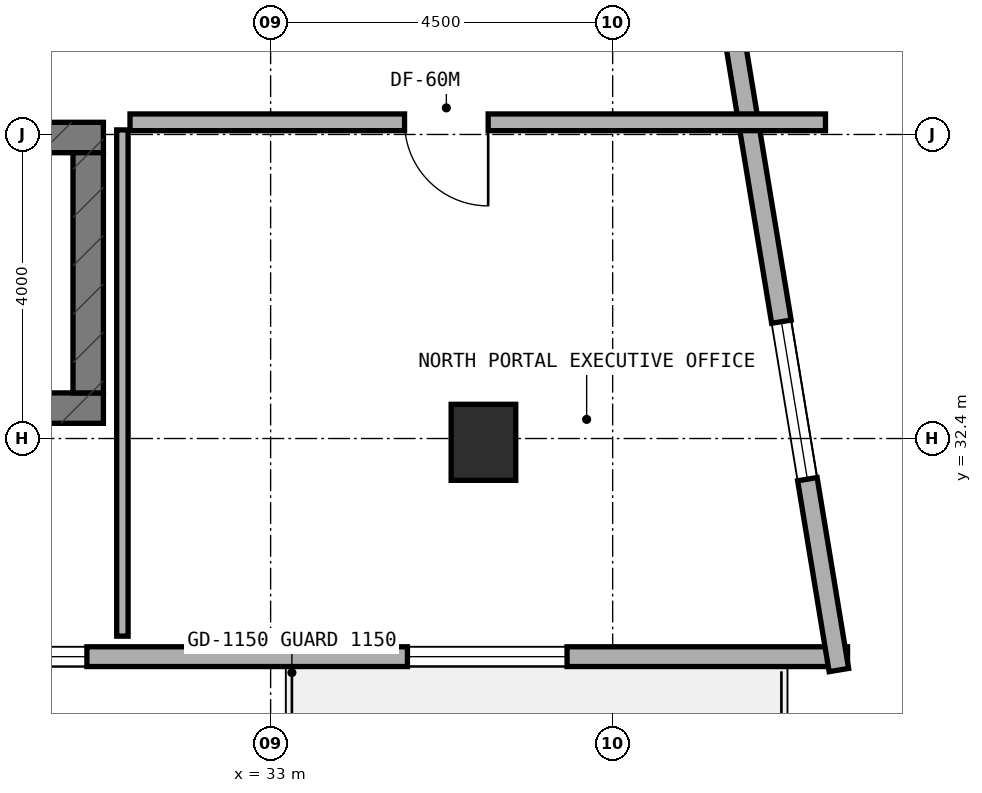
"""IFC4 building model, lengths in metres.
Left out: names, types, materials, properties, quantities, classifications, styles, units other than length and angle.
Written with IfcOpenShell. Run it as: python <this file> out.ifc"""

import sys

from ifc_helpers import new_model, si_unit, direction, frame, frame_2d, origin, origin_2d, place, context, subcontext, project, spatial, rectangle, extrude, element, fill, save


model = new_model("IFC4")
c1 = context("Model", 3, precision=1e-05, world=origin(), true_north=direction((0.0, 1.0)))
c2 = subcontext(c1, "Body", "Model", "MODEL_VIEW")
j1 = project(units=[si_unit("LENGTHUNIT", "METRE"), si_unit("PLANEANGLEUNIT", "RADIAN")], contexts=[c1])
p1 = place(None, origin())
s1 = spatial("IfcSite", under=j1, at=p1, CompositionType="ELEMENT")
p2 = place(p1, origin())
s2 = spatial("IfcBuilding", under=s1, at=p2, CompositionType="ELEMENT")
p3 = place(p2, frame((0.0, 0.0, 177.5)))
s3 = spatial("IfcBuildingStorey", under=s2, at=p3, CompositionType="ELEMENT", Elevation=177.5)
p4 = place(p3, frame((6.4, 32.8, 0.0), z_axis=(0.0, 0.0, 1.0), x_axis=(1.0, 0.0, 0.0)))
e1 = element("IfcWall", 1, at=p4, inside=s3, PredefinedType="SHEAR", context=c2, shape_type="SweptSolid", body=[
    extrude(rectangle(XDim=24.4, YDim=0.4, at=frame_2d((12.2, 0.0))), origin(), (0.0, 0.0, 1.0), 3.6),
])
p5 = place(p4, frame((6.05, 0.0, 0.0)))
e2 = element("IfcOpeningElement", 2, at=p5, cuts=e1, PredefinedType="OPENING", context=c2, shape_type="SweptSolid", body=[
    extrude(rectangle(XDim=1.1, YDim=2.15, at=frame_2d((0.55, 1.075))), frame((0.0, 0.21, 0.0), z_axis=(0.0, -1.0, 0.0), x_axis=(1.0, 0.0, 0.0)), (0.0, 0.0, 1.0), 0.42),
])
p6 = place(p3, frame((6.4, 36.36, 0.0), z_axis=(0.0, 0.0, 1.0), x_axis=(1.0, 0.0, 0.0)))
e3 = element("IfcWall", 3, at=p6, inside=s3, PredefinedType="SHEAR", context=c2, shape_type="SweptSolid", body=[
    extrude(rectangle(XDim=24.4, YDim=0.4, at=frame_2d((12.2, 0.0))), origin(), (0.0, 0.0, 1.0), 3.6),
])
p7 = place(p6, frame((9.15, 0.0, 0.0)))
e4 = element("IfcOpeningElement", 4, at=p7, cuts=e3, PredefinedType="OPENING", context=c2, shape_type="SweptSolid", body=[
    extrude(rectangle(XDim=1.2, YDim=2.15, at=frame_2d((0.6, 1.075))), frame((0.0, 0.21, 0.0), z_axis=(0.0, -1.0, 0.0), x_axis=(1.0, 0.0, 0.0)), (0.0, 0.0, 1.0), 0.42),
])
p8 = place(p6, frame((19.2, 0.0, 0.0)))
e5 = element("IfcOpeningElement", 5, at=p8, cuts=e3, PredefinedType="OPENING", context=c2, shape_type="SweptSolid", body=[
    extrude(rectangle(XDim=0.85, YDim=2.1, at=frame_2d((0.425, 1.05))), frame((0.0, 0.21, 0.0), z_axis=(0.0, -1.0, 0.0), x_axis=(1.0, 0.0, 0.0)), (0.0, 0.0, 1.0), 0.42),
])
p9 = place(p6, frame((16.94, 0.0, 0.0)))
e6 = element("IfcOpeningElement", 6, at=p9, cuts=e3, PredefinedType="OPENING", context=c2, shape_type="SweptSolid", body=[
    extrude(rectangle(XDim=0.85, YDim=2.1, at=frame_2d((0.425, 1.05))), frame((0.0, 0.21, 0.0), z_axis=(0.0, -1.0, 0.0), x_axis=(1.0, 0.0, 0.0)), (0.0, 0.0, 1.0), 0.42),
])
p10 = place(p3, frame((30.6, 33.0, 0.0), z_axis=(0.0, 0.0, 1.0), x_axis=(0.0, 1.0, 0.0)))
e7 = element("IfcWall", 7, at=p10, inside=s3, PredefinedType="SHEAR", context=c2, shape_type="SweptSolid", body=[
    extrude(rectangle(XDim=3.16, YDim=0.4, at=frame_2d((1.58, 0.0))), origin(), (0.0, 0.0, 1.0), 3.6),
])
p11 = place(p3, frame((35.8, 32.35, 0.0), z_axis=(0.0, 0.0, 1.0), x_axis=(1.0, 0.0, 0.0)))
e8 = element("IfcColumn", 8, at=p11, inside=s3, PredefinedType="COLUMN", context=c2, shape_type="SweptSolid", body=[
    extrude(rectangle(XDim=0.85, YDim=1.0, at=origin_2d()), origin(), (0.0, 0.0, 1.0), 3.6),
])
p12 = place(p3, frame((28.375, 29.53, 0.0), z_axis=(0.0, 0.0, 1.0), x_axis=(1.0, 0.0, 0.0)))
e9 = element("IfcWall", 9, at=p12, inside=s3, PredefinedType="STANDARD", context=c2, shape_type="SweptSolid", body=[
    extrude(rectangle(XDim=12.215, YDim=0.26, at=frame_2d((6.107, 0.0))), origin(), (0.0, 0.0, 1.0), 2.995),
])
p13 = place(p12, frame((0.408, 0.0, 0.85)))
e10 = element("IfcOpeningElement", 10, at=p13, cuts=e9, PredefinedType="OPENING", context=c2, shape_type="SweptSolid", body=[
    extrude(rectangle(XDim=1.8, YDim=1.5, at=frame_2d((0.9, 0.75))), frame((0.0, 0.14, 0.0), z_axis=(0.0, -1.0, 0.0), x_axis=(1.0, 0.0, 0.0)), (0.0, 0.0, 1.0), 0.28),
])
p14 = place(p12, frame((6.425, 0.0, 0.85)))
e11 = element("IfcOpeningElement", 11, at=p14, cuts=e9, PredefinedType="OPENING", context=c2, shape_type="SweptSolid", body=[
    extrude(rectangle(XDim=2.1, YDim=1.5, at=frame_2d((1.05, 0.75))), frame((0.0, 0.14, 0.0), z_axis=(0.0, -1.0, 0.0), x_axis=(1.0, 0.0, 0.0)), (0.0, 0.0, 1.0), 0.28),
])
p15 = place(p3, frame((40.476, 29.354, 0.0), z_axis=(0.0, 0.0, 1.0), x_axis=(-0.162811037825, 0.986657268742, 0.0)))
e12 = element("IfcWall", 12, at=p15, inside=s3, PredefinedType="STANDARD", context=c2, shape_type="SweptSolid", body=[
    extrude(rectangle(XDim=10.473, YDim=0.26, at=frame_2d((5.236, 0.0))), origin(), (0.0, 0.0, 1.0), 3.32),
])
p16 = place(p15, frame((2.545, 0.0, 0.85)))
e13 = element("IfcOpeningElement", 13, at=p16, cuts=e12, PredefinedType="OPENING", context=c2, shape_type="SweptSolid", body=[
    extrude(rectangle(XDim=2.1, YDim=1.5, at=frame_2d((1.05, 0.75))), frame((0.0, 0.14, 0.0), z_axis=(0.0, -1.0, 0.0), x_axis=(1.0, 0.0, 0.0)), (0.0, 0.0, 1.0), 0.28),
])
p17 = place(p3, frame((31.05, 29.8, 0.0), z_axis=(0.0, 0.0, 1.0), x_axis=(0.0, 1.0, 0.0)))
e14 = element("IfcWall", 14, at=p17, inside=s3, PredefinedType="PARTITIONING", context=c2, shape_type="SweptSolid", body=[
    extrude(rectangle(XDim=6.66, YDim=0.15, at=frame_2d((3.33, 0.0))), origin(), (0.0, 0.0, 1.0), 2.995),
])
p18 = place(p3, frame((31.15, 36.56, 0.0), z_axis=(0.0, 0.0, 1.0), x_axis=(1.0, 0.0, 0.0)))
e15 = element("IfcWall", 15, at=p18, inside=s3, PredefinedType="SOLIDWALL", context=c2, shape_type="SweptSolid", body=[
    extrude(rectangle(XDim=9.15, YDim=0.22, at=frame_2d((4.575, 0.0))), origin(), (0.0, 0.0, 1.0), 2.935),
])
p19 = place(p18, frame((3.612, 0.0, 0.0)))
e16 = element("IfcOpeningElement", 16, at=p19, cuts=e15, PredefinedType="OPENING", context=c2, shape_type="SweptSolid", body=[
    extrude(rectangle(XDim=1.1, YDim=2.1, at=frame_2d((0.55, 1.05))), frame((0.0, 0.12, 0.0), z_axis=(0.0, -1.0, 0.0), x_axis=(1.0, 0.0, 0.0)), (0.0, 0.0, 1.0), 0.24),
])
p20 = place(p13, origin())
e17 = element("IfcWindow", 17, at=p20, inside=s3, PartitioningType="SINGLE_PANEL", PredefinedType="WINDOW", context=c2, shape_type="SweptSolid", body=[
    extrude(rectangle(XDim=1.8, YDim=1.5, at=frame_2d((0.9, 0.75))), frame((0.0, 0.03, 0.0), z_axis=(0.0, -1.0, 0.0), x_axis=(1.0, 0.0, 0.0)), (0.0, 0.0, 1.0), 0.06),
])
fill(e10, e17)
p21 = place(p14, origin())
e18 = element("IfcWindow", 18, at=p21, inside=s3, PartitioningType="SINGLE_PANEL", PredefinedType="WINDOW", context=c2, shape_type="SweptSolid", body=[
    extrude(rectangle(XDim=2.1, YDim=1.5, at=frame_2d((1.05, 0.75))), frame((0.0, 0.03, 0.0), z_axis=(0.0, -1.0, 0.0), x_axis=(1.0, 0.0, 0.0)), (0.0, 0.0, 1.0), 0.06),
])
fill(e11, e18)
p22 = place(p16, origin())
e19 = element("IfcWindow", 19, at=p22, inside=s3, PartitioningType="SINGLE_PANEL", PredefinedType="WINDOW", context=c2, shape_type="SweptSolid", body=[
    extrude(rectangle(XDim=2.1, YDim=1.5, at=frame_2d((1.05, 0.75))), frame((0.0, 0.03, 0.0), z_axis=(0.0, -1.0, 0.0), x_axis=(1.0, 0.0, 0.0)), (0.0, 0.0, 1.0), 0.06),
])
fill(e13, e19)
p23 = place(p19, frame((1.1, 0.0, 0.0), z_axis=(0.0, 0.0, 1.0), x_axis=(-1.0, 0.0, 0.0)))
e20 = element("IfcDoor", 20, at=p23, inside=s3, OperationType="SINGLE_SWING_LEFT", PredefinedType="DOOR", context=c2, shape_type="SweptSolid", body=[
    extrude(rectangle(XDim=1.1, YDim=2.1, at=frame_2d((0.55, 1.05))), frame((0.0, 0.025, 0.0), z_axis=(0.0, -1.0, 0.0), x_axis=(1.0, 0.0, 0.0)), (0.0, 0.0, 1.0), 0.05),
])
fill(e16, e20)
save(model, sys.argv[1])
